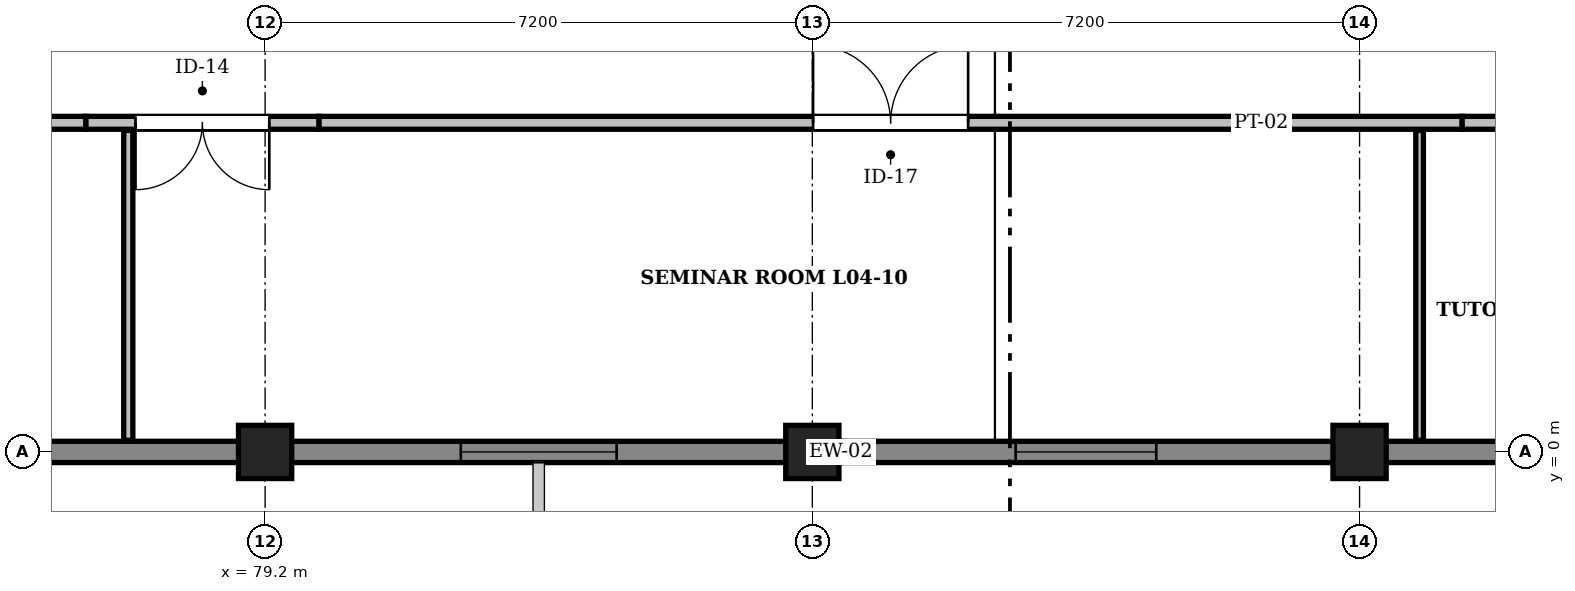
"""IFC4 building model, lengths in metres.
Left out: names, types, materials, properties, quantities, classifications, styles, units other than length and angle.
Written with IfcOpenShell. Run it as: python <this file> out.ifc"""

import sys

from ifc_helpers import new_model, si_unit, direction, frame, frame_2d, origin, origin_2d, place, context, subcontext, project, spatial, rectangle, extrude, element, fill, save


model = new_model("IFC4")
c1 = context("Model", 3, precision=1e-05, world=origin(), true_north=direction((0.0, 1.0)))
c2 = subcontext(c1, "Body", "Model", "MODEL_VIEW")
j1 = project(units=[si_unit("LENGTHUNIT", "METRE"), si_unit("PLANEANGLEUNIT", "RADIAN")], contexts=[c1])
p1 = place(None, origin())
s1 = spatial("IfcSite", under=j1, at=p1, CompositionType="ELEMENT")
p2 = place(p1, origin())
s2 = spatial("IfcBuilding", under=s1, at=p2, CompositionType="ELEMENT")
p3 = place(p2, frame((0.0, 0.0, 18.9)))
s3 = spatial("IfcBuildingStorey", under=s2, at=p3, CompositionType="ELEMENT", Elevation=18.9)
for number, where, z_axis, x_axis in (
    (1, (79.2, 0.0, 0.0), (0.0, 0.0, 1.0), (1.0, 0.0, 0.0)),
    (2, (86.4, 0.0, 0.0), (0.0, 0.0, 1.0), (1.0, 0.0, 0.0)),
    (3, (93.6, 0.0, 0.0), (0.0, 0.0, 1.0), (1.0, 0.0, 0.0)),
):
    element("IfcColumn", number, at=place(p3, frame(where, z_axis=z_axis, x_axis=x_axis)), inside=s3, PredefinedType="COLUMN", context=c2, shape_type="SweptSolid", body=[
        extrude(rectangle(XDim=0.7, YDim=0.7, at=origin_2d()), origin(), (0.0, 0.0, 1.0), 4.5),
    ])
p4 = place(p3, frame((100.8, 0.0, 0.0), z_axis=(0.0, 0.0, 1.0), x_axis=(-1.0, 0.0, 0.0)))
e4 = element("IfcWall", 4, at=p4, inside=s3, PredefinedType="SOLIDWALL", context=c2, shape_type="SweptSolid", body=[
    extrude(rectangle(XDim=7.2, YDim=0.28, at=frame_2d((3.6, 0.0))), origin(), (0.0, 0.0, 1.0), 4.22),
])
p5 = place(p4, frame((3.06, 0.0, 0.95)))
e5 = element("IfcOpeningElement", 5, at=p5, cuts=e4, PredefinedType="OPENING", context=c2, shape_type="SweptSolid", body=[
    extrude(rectangle(XDim=1.7, YDim=1.55, at=frame_2d((0.85, 0.775))), frame((0.0, 0.152, 0.0), z_axis=(0.0, -1.0, 0.0), x_axis=(1.0, 0.0, 0.0)), (0.0, 0.0, 1.0), 0.304),
])
p6 = place(p3, frame((93.6, 0.0, 0.0), z_axis=(0.0, 0.0, 1.0), x_axis=(-1.0, 0.0, 0.0)))
e6 = element("IfcWall", 6, at=p6, inside=s3, PredefinedType="SOLIDWALL", context=c2, shape_type="SweptSolid", body=[
    extrude(rectangle(XDim=7.2, YDim=0.28, at=frame_2d((3.6, 0.0))), origin(), (0.0, 0.0, 1.0), 4.22),
])
p7 = place(p6, frame((2.675, 0.0, 0.95)))
e7 = element("IfcOpeningElement", 7, at=p7, cuts=e6, PredefinedType="OPENING", context=c2, shape_type="SweptSolid", body=[
    extrude(rectangle(XDim=1.85, YDim=1.55, at=frame_2d((0.925, 0.775))), frame((0.0, 0.152, 0.0), z_axis=(0.0, -1.0, 0.0), x_axis=(1.0, 0.0, 0.0)), (0.0, 0.0, 1.0), 0.304),
])
p8 = place(p3, frame((86.4, 0.0, 0.0), z_axis=(0.0, 0.0, 1.0), x_axis=(-1.0, 0.0, 0.0)))
e8 = element("IfcWall", 8, at=p8, inside=s3, PredefinedType="SOLIDWALL", context=c2, shape_type="SweptSolid", body=[
    extrude(rectangle(XDim=7.2, YDim=0.28, at=frame_2d((3.6, 0.0))), origin(), (0.0, 0.0, 1.0), 4.22),
])
p9 = place(p8, frame((2.575, 0.0, 0.95)))
e9 = element("IfcOpeningElement", 9, at=p9, cuts=e8, PredefinedType="OPENING", context=c2, shape_type="SweptSolid", body=[
    extrude(rectangle(XDim=2.05, YDim=1.55, at=frame_2d((1.025, 0.775))), frame((0.0, 0.152, 0.0), z_axis=(0.0, -1.0, 0.0), x_axis=(1.0, 0.0, 0.0)), (0.0, 0.0, 1.0), 0.304),
])
p10 = place(p3, frame((79.2, 0.0, 0.0), z_axis=(0.0, 0.0, 1.0), x_axis=(-1.0, 0.0, 0.0)))
e10 = element("IfcWall", 10, at=p10, inside=s3, PredefinedType="SOLIDWALL", context=c2, shape_type="SweptSolid", body=[
    extrude(rectangle(XDim=7.2, YDim=0.28, at=frame_2d((3.6, 0.0))), origin(), (0.0, 0.0, 1.0), 4.22),
])
p11 = place(p10, frame((3.365, 0.0, 0.95)))
e11 = element("IfcOpeningElement", 11, at=p11, cuts=e10, PredefinedType="OPENING", context=c2, shape_type="SweptSolid", body=[
    extrude(rectangle(XDim=2.25, YDim=1.55, at=frame_2d((1.125, 0.775))), frame((0.0, 0.152, 0.0), z_axis=(0.0, -1.0, 0.0), x_axis=(1.0, 0.0, 0.0)), (0.0, 0.0, 1.0), 0.304),
])
p12 = place(p3, frame((76.84, 4.33, 0.0), z_axis=(0.0, 0.0, 1.0), x_axis=(1.0, 0.0, 0.0)))
e12 = element("IfcWall", 12, at=p12, inside=s3, PredefinedType="PARTITIONING", context=c2, shape_type="SweptSolid", body=[
    extrude(rectangle(XDim=3.07, YDim=0.17, at=frame_2d((1.535, 0.0))), origin(), (0.0, 0.0, 1.0), 4.16),
])
p13 = place(p12, frame((0.655, 0.0, 0.0)))
e13 = element("IfcOpeningElement", 13, at=p13, cuts=e12, PredefinedType="OPENING", context=c2, shape_type="SweptSolid", body=[
    extrude(rectangle(XDim=1.76, YDim=2.3, at=frame_2d((0.88, 1.15))), frame((0.0, 0.097, 0.0), z_axis=(0.0, -1.0, 0.0), x_axis=(1.0, 0.0, 0.0)), (0.0, 0.0, 1.0), 0.194),
])
p14 = place(p3, frame((79.91, 4.33, 0.0), z_axis=(0.0, 0.0, 1.0), x_axis=(1.0, 0.0, 0.0)))
e14 = element("IfcWall", 14, at=p14, inside=s3, PredefinedType="PARTITIONING", context=c2, shape_type="SweptSolid", body=[
    extrude(rectangle(XDim=15.04, YDim=0.17, at=frame_2d((7.52, 0.0))), origin(), (0.0, 0.0, 1.0), 4.16),
])
p15 = place(p14, frame((6.5, 0.0, 0.0)))
e15 = element("IfcOpeningElement", 15, at=p15, cuts=e14, PredefinedType="OPENING", context=c2, shape_type="SweptSolid", body=[
    extrude(rectangle(XDim=2.04, YDim=2.34, at=frame_2d((1.02, 1.17))), frame((0.0, 0.097, 0.0), z_axis=(0.0, -1.0, 0.0), x_axis=(1.0, 0.0, 0.0)), (0.0, 0.0, 1.0), 0.194),
])
p16 = place(p3, frame((94.95, 4.33, 0.0), z_axis=(0.0, 0.0, 1.0), x_axis=(1.0, 0.0, 0.0)))
e16 = element("IfcWall", 16, at=p16, inside=s3, PredefinedType="PARTITIONING", context=c2, shape_type="SweptSolid", body=[
    extrude(rectangle(XDim=3.989, YDim=0.17, at=frame_2d((1.994, 0.0))), origin(), (0.0, 0.0, 1.0), 4.16),
])
p17 = place(p16, frame((1.214, 0.0, 0.0)))
e17 = element("IfcOpeningElement", 17, at=p17, cuts=e16, PredefinedType="OPENING", context=c2, shape_type="SweptSolid", body=[
    extrude(rectangle(XDim=1.56, YDim=2.26, at=frame_2d((0.78, 1.13))), frame((0.0, 0.097, 0.0), z_axis=(0.0, -1.0, 0.0), x_axis=(1.0, 0.0, 0.0)), (0.0, 0.0, 1.0), 0.194),
])
p18 = place(p3, frame((60.981, 4.33, 0.0), z_axis=(0.0, 0.0, 1.0), x_axis=(1.0, 0.0, 0.0)))
e18 = element("IfcWall", 18, at=p18, inside=s3, PredefinedType="PARTITIONING", context=c2, shape_type="SweptSolid", body=[
    extrude(rectangle(XDim=15.859, YDim=0.17, at=frame_2d((7.929, 0.0))), origin(), (0.0, 0.0, 1.0), 4.16),
])
p19 = place(p18, frame((6.969, 0.0, 0.0)))
e19 = element("IfcOpeningElement", 19, at=p19, cuts=e18, PredefinedType="OPENING", context=c2, shape_type="SweptSolid", body=[
    extrude(rectangle(XDim=1.92, YDim=2.32, at=frame_2d((0.96, 1.16))), frame((0.0, 0.097, 0.0), z_axis=(0.0, -1.0, 0.0), x_axis=(1.0, 0.0, 0.0)), (0.0, 0.0, 1.0), 0.194),
])
p20 = place(p3, frame((77.4, 0.152, 0.0), z_axis=(0.0, 0.0, 1.0), x_axis=(0.0, 1.0, 0.0)))
e20 = element("IfcWall", 20, at=p20, inside=s3, PredefinedType="PARTITIONING", context=c2, shape_type="SweptSolid", body=[
    extrude(rectangle(XDim=4.078, YDim=0.12, at=frame_2d((2.039, 0.0))), origin(), (0.0, 0.0, 1.0), 4.16),
])
p21 = place(p3, frame((94.39, 0.152, 0.0), z_axis=(0.0, 0.0, 1.0), x_axis=(0.0, 1.0, 0.0)))
e21 = element("IfcWall", 21, at=p21, inside=s3, PredefinedType="PARTITIONING", context=c2, shape_type="SweptSolid", body=[
    extrude(rectangle(XDim=4.078, YDim=0.1, at=frame_2d((2.039, 0.0))), origin(), (0.0, 0.0, 1.0), 4.16),
])
p22 = place(p7, origin())
e22 = element("IfcWindow", 22, at=p22, inside=s3, PartitioningType="SINGLE_PANEL", PredefinedType="WINDOW", context=c2, shape_type="SweptSolid", body=[
    extrude(rectangle(XDim=1.85, YDim=1.55, at=frame_2d((0.925, 0.775))), frame((0.0, 0.03, 0.0), z_axis=(0.0, -1.0, 0.0), x_axis=(1.0, 0.0, 0.0)), (0.0, 0.0, 1.0), 0.06),
])
fill(e7, e22)
p23 = place(p9, origin())
e23 = element("IfcWindow", 23, at=p23, inside=s3, PartitioningType="SINGLE_PANEL", PredefinedType="WINDOW", context=c2, shape_type="SweptSolid", body=[
    extrude(rectangle(XDim=2.05, YDim=1.55, at=frame_2d((1.025, 0.775))), frame((0.0, 0.03, 0.0), z_axis=(0.0, -1.0, 0.0), x_axis=(1.0, 0.0, 0.0)), (0.0, 0.0, 1.0), 0.06),
])
fill(e9, e23)
p24 = place(p15, origin())
e24 = element("IfcDoor", 24, at=p24, inside=s3, OperationType="DOUBLE_DOOR_SINGLE_SWING", PredefinedType="DOOR", context=c2, shape_type="SweptSolid", body=[
    extrude(rectangle(XDim=2.04, YDim=2.34, at=frame_2d((1.02, 1.17))), frame((0.0, 0.025, 0.0), z_axis=(0.0, -1.0, 0.0), x_axis=(1.0, 0.0, 0.0)), (0.0, 0.0, 1.0), 0.05),
])
fill(e15, e24)
p25 = place(p13, frame((1.76, 0.0, 0.0), z_axis=(0.0, 0.0, 1.0), x_axis=(-1.0, 0.0, 0.0)))
e25 = element("IfcDoor", 25, at=p25, inside=s3, OperationType="DOUBLE_DOOR_SINGLE_SWING", PredefinedType="DOOR", context=c2, shape_type="SweptSolid", body=[
    extrude(rectangle(XDim=1.76, YDim=2.3, at=frame_2d((0.88, 1.15))), frame((0.0, 0.025, 0.0), z_axis=(0.0, -1.0, 0.0), x_axis=(1.0, 0.0, 0.0)), (0.0, 0.0, 1.0), 0.05),
])
fill(e13, e25)
save(model, sys.argv[1])
